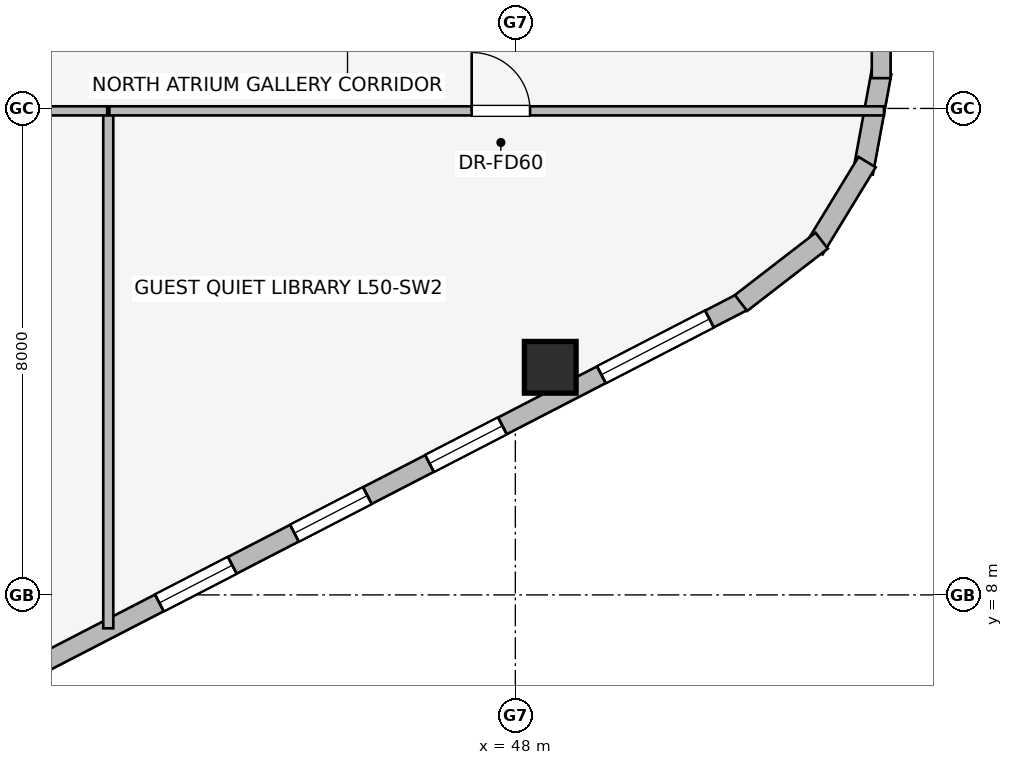
"""IFC4 building model, lengths in metres.
Left out: names, types, materials, properties, quantities, classifications, styles, units other than length and angle.
Written with IfcOpenShell. Run it as: python <this file> out.ifc"""

import sys

from ifc_helpers import new_model, si_unit, direction, frame, frame_2d, origin, origin_2d, place, context, subcontext, project, spatial, rectangle, extrude, element, fill, save


model = new_model("IFC4")
c1 = context("Model", 3, precision=1e-05, world=origin(), true_north=direction((0.0, 1.0)))
c2 = subcontext(c1, "Body", "Model", "MODEL_VIEW")
j1 = project(units=[si_unit("LENGTHUNIT", "METRE"), si_unit("PLANEANGLEUNIT", "RADIAN")], contexts=[c1])
p1 = place(None, origin())
s1 = spatial("IfcSite", under=j1, at=p1, CompositionType="ELEMENT")
p2 = place(p1, origin())
s2 = spatial("IfcBuilding", under=s1, at=p2, CompositionType="ELEMENT")
p3 = place(p2, frame((0.0, 0.0, 184.35)))
s3 = spatial("IfcBuildingStorey", under=s2, at=p3, CompositionType="ELEMENT", Elevation=184.35)
p4 = place(p3, frame((48.574, 11.743, 0.0), z_axis=(0.0, 0.0, 1.0), x_axis=(1.0, 0.0, 0.0)))
e1 = element("IfcColumn", 1, at=p4, inside=s3, PredefinedType="COLUMN", context=c2, shape_type="SweptSolid", body=[
    extrude(rectangle(XDim=0.85, YDim=0.85, at=origin_2d()), origin(), (0.0, 0.0, 1.0), 3.45),
])
p5 = place(p3, frame((51.792, 12.847, 0.0), z_axis=(0.0, 0.0, 1.0), x_axis=(-0.888626188278, -0.458632202867, 0.0)))
e2 = element("IfcWall", 2, at=p5, inside=s3, PredefinedType="STANDARD", context=c2, shape_type="SweptSolid", body=[
    extrude(rectangle(XDim=16.828, YDim=0.31, at=frame_2d((8.414, 0.0))), origin(), (0.0, 0.0, 1.0), 3.19),
])
p6 = place(p5, frame((0.675, 0.0, 0.75)))
e3 = element("IfcOpeningElement", 3, at=p6, cuts=e2, PredefinedType="OPENING", context=c2, shape_type="SweptSolid", body=[
    extrude(rectangle(XDim=2.0, YDim=1.5, at=frame_2d((1.0, 0.75))), frame((0.0, 0.165, 0.0), z_axis=(0.0, -1.0, 0.0), x_axis=(1.0, 0.0, 0.0)), (0.0, 0.0, 1.0), 0.33),
])
p7 = place(p5, frame((4.506, 0.0, 0.75)))
e4 = element("IfcOpeningElement", 4, at=p7, cuts=e2, PredefinedType="OPENING", context=c2, shape_type="SweptSolid", body=[
    extrude(rectangle(XDim=1.35, YDim=1.45, at=frame_2d((0.675, 0.725))), frame((0.0, 0.165, 0.0), z_axis=(0.0, -1.0, 0.0), x_axis=(1.0, 0.0, 0.0)), (0.0, 0.0, 1.0), 0.33),
])
p8 = place(p5, frame((7.006, 0.0, 0.75)))
e5 = element("IfcOpeningElement", 5, at=p8, cuts=e2, PredefinedType="OPENING", context=c2, shape_type="SweptSolid", body=[
    extrude(rectangle(XDim=1.35, YDim=1.45, at=frame_2d((0.675, 0.725))), frame((0.0, 0.165, 0.0), z_axis=(0.0, -1.0, 0.0), x_axis=(1.0, 0.0, 0.0)), (0.0, 0.0, 1.0), 0.33),
])
p9 = place(p5, frame((9.506, 0.0, 0.75)))
e6 = element("IfcOpeningElement", 6, at=p9, cuts=e2, PredefinedType="OPENING", context=c2, shape_type="SweptSolid", body=[
    extrude(rectangle(XDim=1.35, YDim=1.45, at=frame_2d((0.675, 0.725))), frame((0.0, 0.165, 0.0), z_axis=(0.0, -1.0, 0.0), x_axis=(1.0, 0.0, 0.0)), (0.0, 0.0, 1.0), 0.33),
])
p10 = place(p5, frame((14.153, 0.0, 0.75)))
e7 = element("IfcOpeningElement", 7, at=p10, cuts=e2, PredefinedType="OPENING", context=c2, shape_type="SweptSolid", body=[
    extrude(rectangle(XDim=2.0, YDim=1.5, at=frame_2d((1.0, 0.75))), frame((0.0, 0.165, 0.0), z_axis=(0.0, -1.0, 0.0), x_axis=(1.0, 0.0, 0.0)), (0.0, 0.0, 1.0), 0.33),
])
p11 = place(p3, frame((54.021, 16.592, 0.0), z_axis=(0.0, 0.0, 1.0), x_axis=(-0.180717642671, -0.983535019014, 0.0)))
e8 = element("IfcWall", 8, at=p11, inside=s3, PredefinedType="STANDARD", context=c2, shape_type="SweptSolid", body=[
    extrude(rectangle(XDim=1.677, YDim=0.33, at=frame_2d((0.838, 0.0))), origin(), (0.0, 0.0, 1.0), 3.19),
])
p12 = place(p3, frame((53.785, 15.118, 0.0), z_axis=(0.0, 0.0, 1.0), x_axis=(-0.520219286058, -0.85403272444, 0.0)))
e9 = element("IfcWall", 9, at=p12, inside=s3, PredefinedType="STANDARD", context=c2, shape_type="SweptSolid", body=[
    extrude(rectangle(XDim=1.678, YDim=0.33, at=frame_2d((0.839, 0.0))), origin(), (0.0, 0.0, 1.0), 3.19),
])
p13 = place(p3, frame((53.038, 13.825, 0.0), z_axis=(0.0, 0.0, 1.0), x_axis=(-0.791464279355, -0.611215423976, 0.0)))
e10 = element("IfcWall", 10, at=p13, inside=s3, PredefinedType="STANDARD", context=c2, shape_type="SweptSolid", body=[
    extrude(rectangle(XDim=1.677, YDim=0.33, at=frame_2d((0.838, 0.0))), origin(), (0.0, 0.0, 1.0), 3.19),
])
p14 = place(p3, frame((54.017, 31.502, 0.0), z_axis=(0.0, 0.0, 1.0), x_axis=(0.0, -1.0, 0.0)))
e11 = element("IfcWall", 11, at=p14, inside=s3, PredefinedType="STANDARD", context=c2, shape_type="SweptSolid", body=[
    extrude(rectangle(XDim=15.004, YDim=0.31, at=frame_2d((7.502, 0.0))), origin(), (0.0, 0.0, 1.0), 3.19),
])
p15 = place(p14, frame((4.353, 0.0, 0.75)))
e12 = element("IfcOpeningElement", 12, at=p15, cuts=e11, PredefinedType="OPENING", context=c2, shape_type="SweptSolid", body=[
    extrude(rectangle(XDim=2.0, YDim=1.5, at=frame_2d((1.0, 0.75))), frame((0.0, 0.165, 0.0), z_axis=(0.0, -1.0, 0.0), x_axis=(1.0, 0.0, 0.0)), (0.0, 0.0, 1.0), 0.33),
])
p16 = place(p14, frame((8.083, 0.0, 0.75)))
e13 = element("IfcOpeningElement", 13, at=p16, cuts=e11, PredefinedType="OPENING", context=c2, shape_type="SweptSolid", body=[
    extrude(rectangle(XDim=1.35, YDim=1.45, at=frame_2d((0.675, 0.725))), frame((0.0, 0.165, 0.0), z_axis=(0.0, -1.0, 0.0), x_axis=(1.0, 0.0, 0.0)), (0.0, 0.0, 1.0), 0.33),
])
p17 = place(p14, frame((9.87, 0.0, 0.75)))
e14 = element("IfcOpeningElement", 14, at=p17, cuts=e11, PredefinedType="OPENING", context=c2, shape_type="SweptSolid", body=[
    extrude(rectangle(XDim=1.35, YDim=1.45, at=frame_2d((0.675, 0.725))), frame((0.0, 0.165, 0.0), z_axis=(0.0, -1.0, 0.0), x_axis=(1.0, 0.0, 0.0)), (0.0, 0.0, 1.0), 0.33),
])
p18 = place(p3, frame((41.305, 7.451, 0.0), z_axis=(0.0, 0.0, 1.0), x_axis=(0.0, 1.0, 0.0)))
e15 = element("IfcWall", 15, at=p18, inside=s3, PredefinedType="PARTITIONING", context=c2, shape_type="SweptSolid", body=[
    extrude(rectangle(XDim=8.479, YDim=0.165, at=frame_2d((4.24, 0.0))), origin(), (0.0, 0.0, 1.0), 3.19),
])
p19 = place(p3, frame((32.85, 15.96, 0.0), z_axis=(0.0, 0.0, 1.0), x_axis=(1.0, 0.0, 0.0)))
e16 = element("IfcWall", 16, at=p19, inside=s3, PredefinedType="PARTITIONING", context=c2, shape_type="SweptSolid", body=[
    extrude(rectangle(XDim=8.437, YDim=0.15, at=frame_2d((4.219, 0.0))), origin(), (0.0, 0.0, 1.0), 3.19),
])
p20 = place(p19, frame((3.739, 0.0, 0.0)))
e17 = element("IfcOpeningElement", 17, at=p20, cuts=e16, PredefinedType="OPENING", context=c2, shape_type="SweptSolid", body=[
    extrude(rectangle(XDim=0.96, YDim=2.0, at=frame_2d((0.48, 1.0))), frame((0.0, 0.085, 0.0), z_axis=(0.0, -1.0, 0.0), x_axis=(1.0, 0.0, 0.0)), (0.0, 0.0, 1.0), 0.17),
])
p21 = place(p3, frame((41.323, 15.96, 0.0), z_axis=(0.0, 0.0, 1.0), x_axis=(1.0, 0.0, 0.0)))
e18 = element("IfcWall", 18, at=p21, inside=s3, PredefinedType="PARTITIONING", context=c2, shape_type="SweptSolid", body=[
    extrude(rectangle(XDim=12.74, YDim=0.15, at=frame_2d((6.37, 0.0))), origin(), (0.0, 0.0, 1.0), 3.19),
])
p22 = place(p21, frame((5.959, 0.0, 0.0)))
e19 = element("IfcOpeningElement", 19, at=p22, cuts=e18, PredefinedType="OPENING", context=c2, shape_type="SweptSolid", body=[
    extrude(rectangle(XDim=0.96, YDim=2.0, at=frame_2d((0.48, 1.0))), frame((0.0, 0.085, 0.0), z_axis=(0.0, -1.0, 0.0), x_axis=(1.0, 0.0, 0.0)), (0.0, 0.0, 1.0), 0.17),
])
p23 = place(p6, origin())
e20 = element("IfcWindow", 20, at=p23, inside=s3, PartitioningType="SINGLE_PANEL", PredefinedType="WINDOW", context=c2, shape_type="SweptSolid", body=[
    extrude(rectangle(XDim=2.0, YDim=1.5, at=frame_2d((1.0, 0.75))), frame((0.0, 0.03, 0.0), z_axis=(0.0, -1.0, 0.0), x_axis=(1.0, 0.0, 0.0)), (0.0, 0.0, 1.0), 0.06),
])
fill(e3, e20)
p24 = place(p7, origin())
e21 = element("IfcWindow", 21, at=p24, inside=s3, PartitioningType="SINGLE_PANEL", PredefinedType="WINDOW", context=c2, shape_type="SweptSolid", body=[
    extrude(rectangle(XDim=1.35, YDim=1.45, at=frame_2d((0.675, 0.725))), frame((0.0, 0.03, 0.0), z_axis=(0.0, -1.0, 0.0), x_axis=(1.0, 0.0, 0.0)), (0.0, 0.0, 1.0), 0.06),
])
fill(e4, e21)
p25 = place(p8, origin())
e22 = element("IfcWindow", 22, at=p25, inside=s3, PartitioningType="SINGLE_PANEL", PredefinedType="WINDOW", context=c2, shape_type="SweptSolid", body=[
    extrude(rectangle(XDim=1.35, YDim=1.45, at=frame_2d((0.675, 0.725))), frame((0.0, 0.03, 0.0), z_axis=(0.0, -1.0, 0.0), x_axis=(1.0, 0.0, 0.0)), (0.0, 0.0, 1.0), 0.06),
])
fill(e5, e22)
p26 = place(p9, origin())
e23 = element("IfcWindow", 23, at=p26, inside=s3, PartitioningType="SINGLE_PANEL", PredefinedType="WINDOW", context=c2, shape_type="SweptSolid", body=[
    extrude(rectangle(XDim=1.35, YDim=1.45, at=frame_2d((0.675, 0.725))), frame((0.0, 0.03, 0.0), z_axis=(0.0, -1.0, 0.0), x_axis=(1.0, 0.0, 0.0)), (0.0, 0.0, 1.0), 0.06),
])
fill(e6, e23)
p27 = place(p22, origin())
e24 = element("IfcDoor", 24, at=p27, inside=s3, OperationType="SINGLE_SWING_LEFT", PredefinedType="DOOR", context=c2, shape_type="SweptSolid", body=[
    extrude(rectangle(XDim=0.96, YDim=2.0, at=frame_2d((0.48, 1.0))), frame((0.0, 0.025, 0.0), z_axis=(0.0, -1.0, 0.0), x_axis=(1.0, 0.0, 0.0)), (0.0, 0.0, 1.0), 0.05),
])
fill(e19, e24)
save(model, sys.argv[1])
